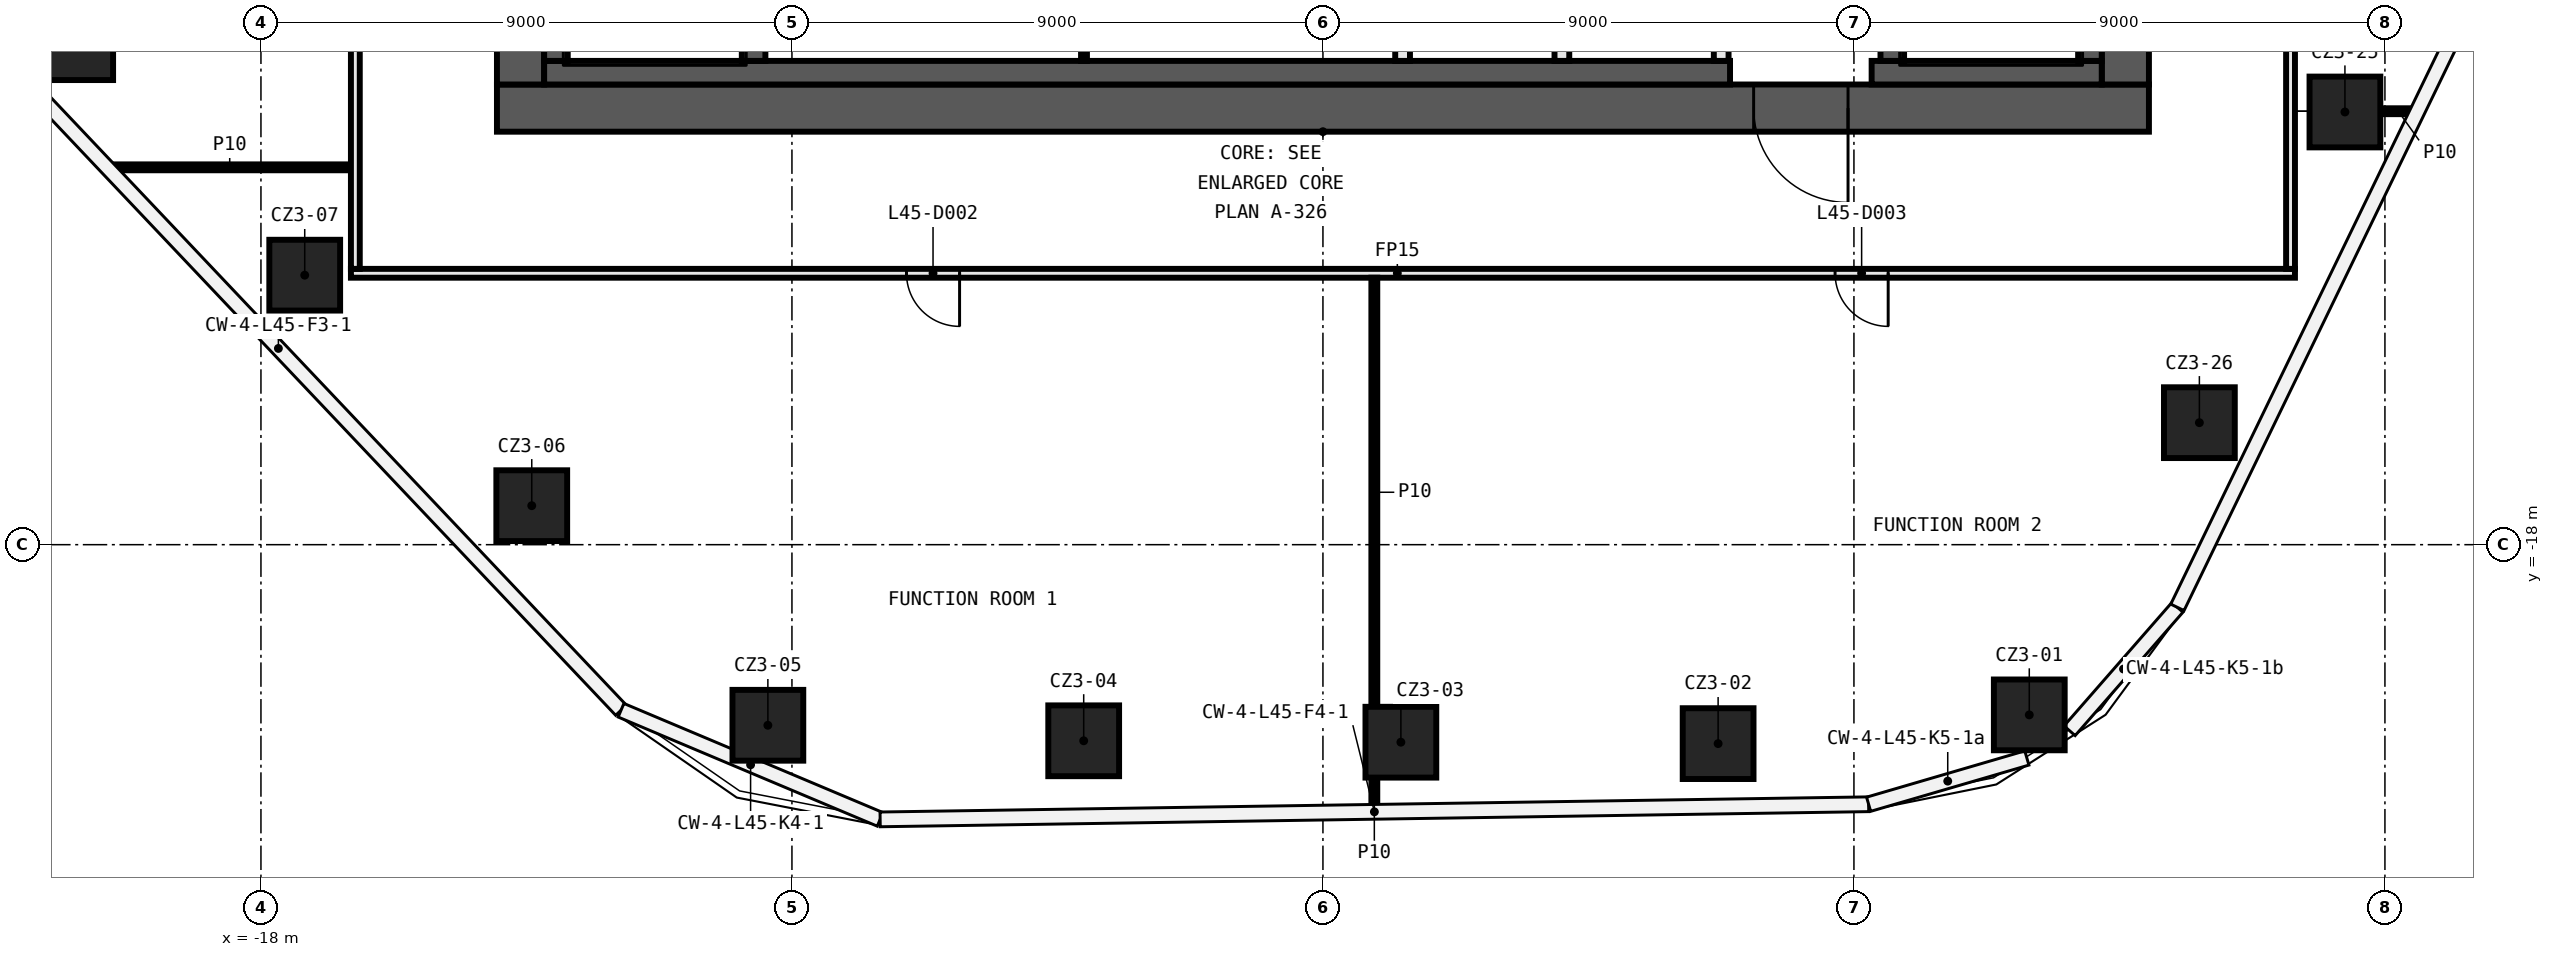
"""IFC4 building model, lengths in metres.
Left out: names, types, materials, properties, quantities, classifications, styles, units other than length and angle.
Written with IfcOpenShell. Run it as: python <this file> out.ifc"""

import sys

from ifc_helpers import new_model, si_unit, direction, frame, frame_2d, origin, origin_2d, place, context, subcontext, project, spatial, rectangle, extrude, element, fill, save


model = new_model("IFC4")
c1 = context("Model", 3, precision=1e-05, world=origin(), true_north=direction((0.0, 1.0)))
c2 = subcontext(c1, "Body", "Model", "MODEL_VIEW")
j1 = project(units=[si_unit("LENGTHUNIT", "METRE"), si_unit("PLANEANGLEUNIT", "RADIAN")], contexts=[c1])
p1 = place(None, origin())
s1 = spatial("IfcSite", under=j1, at=p1, CompositionType="ELEMENT")
p2 = place(p1, origin())
s2 = spatial("IfcBuilding", under=s1, at=p2, CompositionType="ELEMENT")
p3 = place(p2, frame((0.0, 0.0, 215.6)))
s3 = spatial("IfcBuildingStorey", under=s2, at=p3, CompositionType="ELEMENT", Elevation=215.6)
for number, where, z_axis, x_axis in (
    (1, (11.972, -20.885, 0.0), (0.0, 0.0, 1.0), (1.0, 0.0, 0.0)),
    (2, (6.698, -21.372, 0.0), (0.0, 0.0, 1.0), (1.0, 0.0, 0.0)),
    (3, (1.321, -21.348, 0.0), (0.0, 0.0, 1.0), (1.0, 0.0, 0.0)),
    (4, (-4.055, -21.324, 0.0), (0.0, 0.0, 1.0), (1.0, 0.0, 0.0)),
    (5, (-9.408, -21.061, 0.0), (0.0, 0.0, 1.0), (1.0, 0.0, 0.0)),
    (6, (-13.41, -17.339, 0.0), (0.0, 0.0, 1.0), (1.0, 0.0, 0.0)),
    (7, (-17.258, -13.432, 0.0), (0.0, 0.0, 1.0), (1.0, 0.0, 0.0)),
    (8, (-21.106, -9.525, 0.0), (0.0, 0.0, 1.0), (1.0, 0.0, 0.0)),
    (9, (17.322, -10.666, 0.0), (0.0, 0.0, 1.0), (1.0, 0.0, 0.0)),
    (10, (14.855, -15.932, 0.0), (0.0, 0.0, 1.0), (1.0, 0.0, 0.0)),
):
    element("IfcColumn", number, at=place(p3, frame(where, z_axis=z_axis, x_axis=x_axis)), inside=s3, PredefinedType="COLUMN", context=c2, shape_type="SweptSolid", body=[
        extrude(rectangle(XDim=1.2, YDim=1.2, at=origin_2d()), origin(), (0.0, 0.0, 1.0), 4.4),
    ])
p4 = place(p3, frame((16.475, -13.4, 0.0), z_axis=(0.0, 0.0, 1.0), x_axis=(-1.0, 0.0, 0.0)))
e11 = element("IfcWall", 11, at=p4, inside=s3, PredefinedType="PARTITIONING", context=c2, shape_type="SweptSolid", body=[
    extrude(rectangle(XDim=32.95, YDim=0.15, at=frame_2d((16.475, 0.0))), origin(), (0.0, 0.0, 1.0), 4.4),
])
p5 = place(p4, frame((22.634, 0.0, 0.0)))
e12 = element("IfcOpeningElement", 12, at=p5, cuts=e11, PredefinedType="OPENING", context=c2, shape_type="SweptSolid", body=[
    extrude(rectangle(XDim=0.9, YDim=2.1, at=frame_2d((0.45, 1.05))), frame((0.0, 0.085, 0.0), z_axis=(0.0, -1.0, 0.0), x_axis=(1.0, 0.0, 0.0)), (0.0, 0.0, 1.0), 0.17),
])
p6 = place(p4, frame((6.895, 0.0, 0.0)))
e13 = element("IfcOpeningElement", 13, at=p6, cuts=e11, PredefinedType="OPENING", context=c2, shape_type="SweptSolid", body=[
    extrude(rectangle(XDim=0.9, YDim=2.1, at=frame_2d((0.45, 1.05))), frame((0.0, 0.085, 0.0), z_axis=(0.0, -1.0, 0.0), x_axis=(1.0, 0.0, 0.0)), (0.0, 0.0, 1.0), 0.17),
])
p7 = place(p3, frame((-20.584, -11.604, 0.0), z_axis=(0.0, 0.0, 1.0), x_axis=(1.0, 0.0, 0.0)))
e14 = element("IfcWall", 14, at=p7, inside=s3, PredefinedType="PARTITIONING", context=c2, shape_type="SweptSolid", body=[
    extrude(rectangle(XDim=4.109, YDim=0.1, at=frame_2d((2.054, 0.0))), origin(), (0.0, 0.0, 1.0), 4.4),
])
p8 = place(p3, frame((17.922, -10.653, 0.0), z_axis=(0.0, 0.0, 1.0), x_axis=(1.0, 0.0, 0.0)))
e15 = element("IfcWall", 15, at=p8, inside=s3, PredefinedType="PARTITIONING", context=c2, shape_type="SweptSolid", body=[
    extrude(rectangle(XDim=0.608, YDim=0.1, at=frame_2d((0.304, 0.0))), origin(), (0.0, 0.0, 1.0), 4.4),
])
p9 = place(p3, frame((16.4, 13.325, 0.0), z_axis=(0.0, 0.0, 1.0), x_axis=(0.0, -1.0, 0.0)))
e16 = element("IfcWall", 16, at=p9, inside=s3, PredefinedType="PARTITIONING", context=c2, shape_type="SweptSolid", body=[
    extrude(rectangle(XDim=26.65, YDim=0.15, at=frame_2d((13.325, 0.0))), origin(), (0.0, 0.0, 1.0), 4.4),
])
p10 = place(p9, frame((11.866, 0.0, 0.0)))
e17 = element("IfcOpeningElement", 17, at=p10, cuts=e16, PredefinedType="OPENING", context=c2, shape_type="SweptSolid", body=[
    extrude(rectangle(XDim=0.9, YDim=2.1, at=frame_2d((0.45, 1.05))), frame((0.0, 0.085, 0.0), z_axis=(0.0, -1.0, 0.0), x_axis=(1.0, 0.0, 0.0)), (0.0, 0.0, 1.0), 0.17),
])
p11 = place(p9, frame((4.905, 0.0, 0.0)))
e18 = element("IfcOpeningElement", 18, at=p11, cuts=e16, PredefinedType="OPENING", context=c2, shape_type="SweptSolid", body=[
    extrude(rectangle(XDim=0.9, YDim=2.1, at=frame_2d((0.45, 1.05))), frame((0.0, 0.085, 0.0), z_axis=(0.0, -1.0, 0.0), x_axis=(1.0, 0.0, 0.0)), (0.0, 0.0, 1.0), 0.17),
])
p12 = place(p3, frame((0.871, -22.508, 0.0), z_axis=(0.0, 0.0, 1.0), x_axis=(0.0, 1.0, 0.0)))
e19 = element("IfcWall", 19, at=p12, inside=s3, PredefinedType="PARTITIONING", context=c2, shape_type="SweptSolid", body=[
    extrude(rectangle(XDim=0.56, YDim=0.1, at=frame_2d((0.28, 0.0))), origin(), (0.0, 0.0, 1.0), 4.4),
])
p13 = place(p3, frame((0.871, -20.748, 0.0), z_axis=(0.0, 0.0, 1.0), x_axis=(0.0, 1.0, 0.0)))
e20 = element("IfcWall", 20, at=p13, inside=s3, PredefinedType="PARTITIONING", context=c2, shape_type="SweptSolid", body=[
    extrude(rectangle(XDim=7.273, YDim=0.1, at=frame_2d((3.636, 0.0))), origin(), (0.0, 0.0, 1.0), 4.4),
])
p14 = place(p3, frame((-16.4, -13.325, 0.0), z_axis=(0.0, 0.0, 1.0), x_axis=(0.0, 1.0, 0.0)))
e21 = element("IfcWall", 21, at=p14, inside=s3, PredefinedType="PARTITIONING", context=c2, shape_type="SweptSolid", body=[
    extrude(rectangle(XDim=26.65, YDim=0.15, at=frame_2d((13.325, 0.0))), origin(), (0.0, 0.0, 1.0), 4.4),
])
p15 = place(p14, frame((4.962, 0.0, 0.0)))
e22 = element("IfcOpeningElement", 22, at=p15, cuts=e21, PredefinedType="OPENING", context=c2, shape_type="SweptSolid", body=[
    extrude(rectangle(XDim=0.9, YDim=2.1, at=frame_2d((0.45, 1.05))), frame((0.0, 0.085, 0.0), z_axis=(0.0, -1.0, 0.0), x_axis=(1.0, 0.0, 0.0)), (0.0, 0.0, 1.0), 0.17),
])
p16 = place(p3, frame((14.0, -10.6, 0.0), z_axis=(0.0, 0.0, 1.0), x_axis=(-1.0, 0.0, 0.0)))
e23 = element("IfcWall", 23, at=p16, inside=s3, PredefinedType="SHEAR", context=c2, shape_type="SweptSolid", body=[
    extrude(rectangle(XDim=28.0, YDim=0.8, at=frame_2d((14.0, 0.0))), origin(), (0.0, 0.0, 1.0), 4.4),
])
p17 = place(p16, frame((5.1, 0.0, 0.0)))
e24 = element("IfcOpeningElement", 24, at=p17, cuts=e23, PredefinedType="OPENING", context=c2, shape_type="SweptSolid", body=[
    extrude(rectangle(XDim=1.6, YDim=2.1, at=frame_2d((0.8, 1.05))), frame((0.0, 0.41, 0.0), z_axis=(0.0, -1.0, 0.0), x_axis=(1.0, 0.0, 0.0)), (0.0, 0.0, 1.0), 0.82),
])
for number, where, z_axis, x_axis in (
    (25, (13.6, 10.2, 0.0), (0.0, 0.0, 1.0), (0.0, -1.0, 0.0)),
    (26, (-13.6, -10.2, 0.0), (0.0, 0.0, 1.0), (0.0, 1.0, 0.0)),
):
    element("IfcWall", number, at=place(p3, frame(where, z_axis=z_axis, x_axis=x_axis)), inside=s3, PredefinedType="SHEAR", context=c2, shape_type="SweptSolid", body=[
        extrude(rectangle(XDim=20.4, YDim=0.8, at=frame_2d((10.2, 0.0))), origin(), (0.0, 0.0, 1.0), 4.4),
    ])
p18 = place(p3, frame((13.2, -10.0, 0.0), z_axis=(0.0, 0.0, 1.0), x_axis=(-1.0, 0.0, 0.0)))
e27 = element("IfcWall", 27, at=p18, inside=s3, PredefinedType="SHEAR", context=c2, shape_type="SweptSolid", body=[
    extrude(rectangle(XDim=3.9, YDim=0.4, at=frame_2d((1.95, 0.0))), origin(), (0.0, 0.0, 1.0), 4.4),
])
p19 = place(p3, frame((6.9, -10.0, 0.0), z_axis=(0.0, 0.0, 1.0), x_axis=(-1.0, 0.0, 0.0)))
e28 = element("IfcWall", 28, at=p19, inside=s3, PredefinedType="SHEAR", context=c2, shape_type="SweptSolid", body=[
    extrude(rectangle(XDim=20.1, YDim=0.4, at=frame_2d((10.05, 0.0))), origin(), (0.0, 0.0, 1.0), 4.4),
])
for number, where, z_axis, x_axis in (
    (29, (13.0, 9.8, 0.0), (0.0, 0.0, 1.0), (0.0, -1.0, 0.0)),
    (30, (-13.0, -9.8, 0.0), (0.0, 0.0, 1.0), (0.0, 1.0, 0.0)),
):
    element("IfcWall", number, at=place(p3, frame(where, z_axis=z_axis, x_axis=x_axis)), inside=s3, PredefinedType="SHEAR", context=c2, shape_type="SweptSolid", body=[
        extrude(rectangle(XDim=19.6, YDim=0.4, at=frame_2d((9.8, 0.0))), origin(), (0.0, 0.0, 1.0), 4.4),
    ])
p20 = place(p3, frame((9.65, -2.3, 0.0), z_axis=(0.0, 0.0, 1.0), x_axis=(0.0, -1.0, 0.0)))
e31 = element("IfcWall", 31, at=p20, inside=s3, PredefinedType="SHEAR", context=c2, shape_type="SweptSolid", body=[
    extrude(rectangle(XDim=7.5, YDim=0.4, at=frame_2d((3.75, 0.0))), origin(), (0.0, 0.0, 1.0), 4.4),
])
p21 = place(p20, frame((1.2, 0.0, 0.0)))
e32 = element("IfcOpeningElement", 32, at=p21, cuts=e31, PredefinedType="OPENING", context=c2, shape_type="SweptSolid", body=[
    extrude(rectangle(XDim=1.2, YDim=2.1, at=frame_2d((0.6, 1.05))), frame((0.0, 0.21, 0.0), z_axis=(0.0, -1.0, 0.0), x_axis=(1.0, 0.0, 0.0)), (0.0, 0.0, 1.0), 0.42),
])
p22 = place(p3, frame((-9.65, -9.8, 0.0), z_axis=(0.0, 0.0, 1.0), x_axis=(0.0, 1.0, 0.0)))
e33 = element("IfcWall", 33, at=p22, inside=s3, PredefinedType="SHEAR", context=c2, shape_type="SweptSolid", body=[
    extrude(rectangle(XDim=7.5, YDim=0.4, at=frame_2d((3.75, 0.0))), origin(), (0.0, 0.0, 1.0), 4.4),
])
p23 = place(p22, frame((5.1, 0.0, 0.0)))
e34 = element("IfcOpeningElement", 34, at=p23, cuts=e33, PredefinedType="OPENING", context=c2, shape_type="SweptSolid", body=[
    extrude(rectangle(XDim=1.2, YDim=2.1, at=frame_2d((0.6, 1.05))), frame((0.0, 0.21, 0.0), z_axis=(0.0, -1.0, 0.0), x_axis=(1.0, 0.0, 0.0)), (0.0, 0.0, 1.0), 0.42),
])
for number, where, z_axis, x_axis in (
    (35, (6.75, -9.8, 0.0), (0.0, 0.0, 1.0), (0.0, 1.0, 0.0)),
    (36, (4.05, -9.8, 0.0), (0.0, 0.0, 1.0), (0.0, 1.0, 0.0)),
    (37, (1.35, -9.8, 0.0), (0.0, 0.0, 1.0), (0.0, 1.0, 0.0)),
):
    element("IfcWall", number, at=place(p3, frame(where, z_axis=z_axis, x_axis=x_axis)), inside=s3, PredefinedType="SOLIDWALL", context=c2, shape_type="SweptSolid", body=[
        extrude(rectangle(XDim=2.725, YDim=0.25, at=frame_2d((1.363, 0.0))), origin(), (0.0, 0.0, 1.0), 4.4),
    ])
p24 = place(p3, frame((-4.05, -9.8, 0.0), z_axis=(0.0, 0.0, 1.0), x_axis=(0.0, 1.0, 0.0)))
e38 = element("IfcWall", 38, at=p24, inside=s3, PredefinedType="PARTITIONING", context=c2, shape_type="SweptSolid", body=[
    extrude(rectangle(XDim=2.725, YDim=0.1, at=frame_2d((1.363, 0.0))), origin(), (0.0, 0.0, 1.0), 4.4),
])
p25 = place(p5, origin())
e39 = element("IfcDoor", 39, at=p25, inside=s3, OperationType="SINGLE_SWING_LEFT", PredefinedType="DOOR", context=c2, shape_type="SweptSolid", body=[
    extrude(rectangle(XDim=0.9, YDim=2.1, at=frame_2d((0.45, 1.05))), frame((0.0, 0.025, 0.0), z_axis=(0.0, -1.0, 0.0), x_axis=(1.0, 0.0, 0.0)), (0.0, 0.0, 1.0), 0.05),
])
fill(e12, e39)
p26 = place(p6, origin())
e40 = element("IfcDoor", 40, at=p26, inside=s3, OperationType="SINGLE_SWING_RIGHT", PredefinedType="DOOR", context=c2, shape_type="SweptSolid", body=[
    extrude(rectangle(XDim=0.9, YDim=2.1, at=frame_2d((0.45, 1.05))), frame((0.0, 0.025, 0.0), z_axis=(0.0, -1.0, 0.0), x_axis=(1.0, 0.0, 0.0)), (0.0, 0.0, 1.0), 0.05),
])
fill(e13, e40)
p27 = place(p17, origin())
e41 = element("IfcDoor", 41, at=p27, inside=s3, OperationType="DOUBLE_DOOR_SINGLE_SWING", PredefinedType="DOOR", context=c2, shape_type="SweptSolid", body=[
    extrude(rectangle(XDim=1.6, YDim=2.1, at=frame_2d((0.8, 1.05))), frame((0.0, 0.025, 0.0), z_axis=(0.0, -1.0, 0.0), x_axis=(1.0, 0.0, 0.0)), (0.0, 0.0, 1.0), 0.05),
])
fill(e24, e41)
save(model, sys.argv[1])
